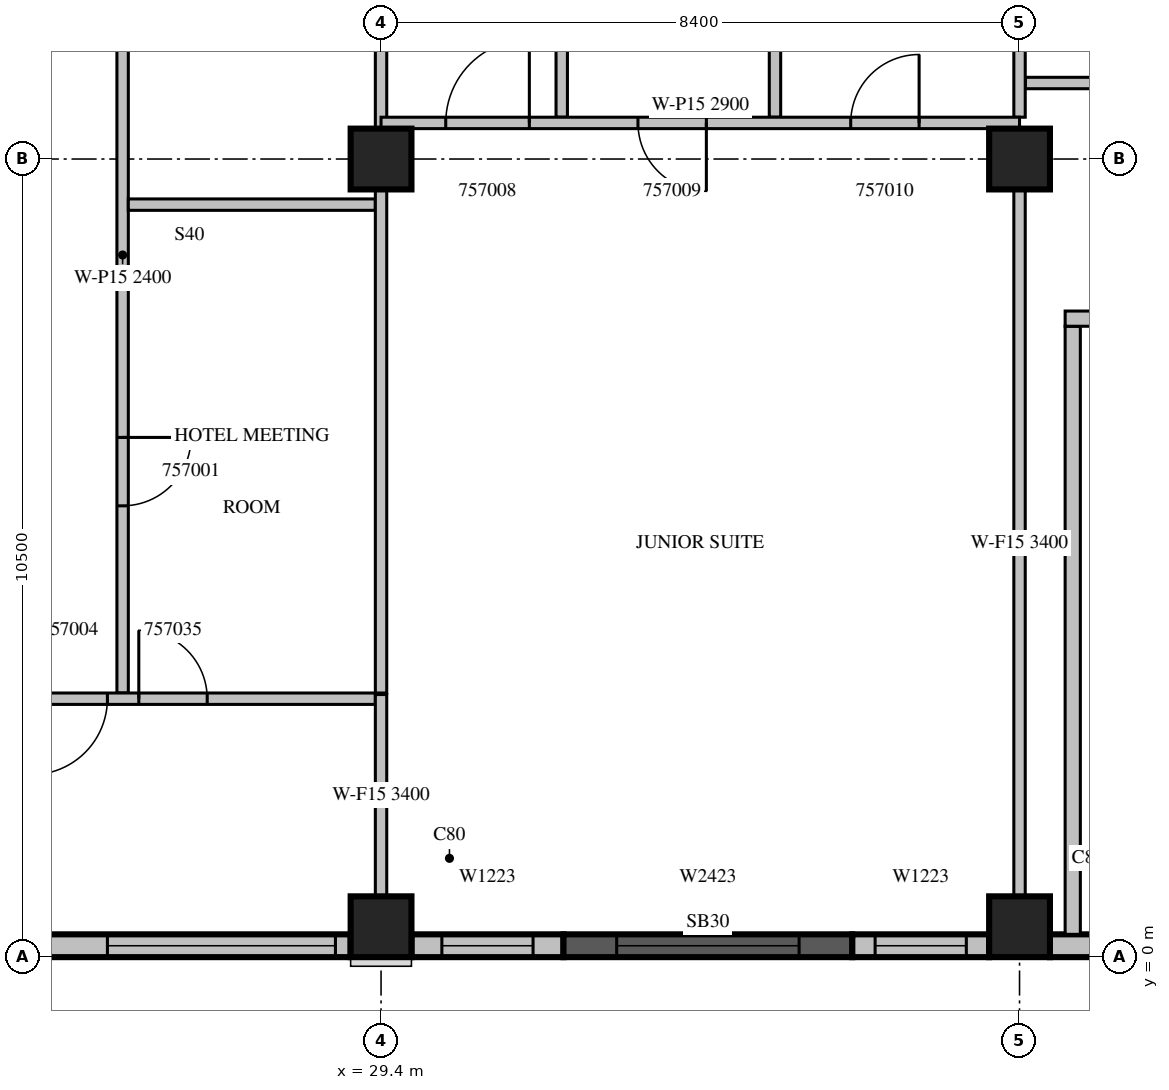
"""IFC4 building model, lengths in metres.
Left out: names, types, materials, properties, quantities, classifications, styles, units other than length and angle.
Written with IfcOpenShell. Run it as: python <this file> out.ifc"""

import sys

from ifc_helpers import new_model, si_unit, direction, frame, frame_2d, origin, origin_2d, place, context, subcontext, project, spatial, rectangle, extrude, source, transform, mapped, element, fill, save


model = new_model("IFC4")
c1 = context("Model", 3, precision=1e-05, world=origin(), true_north=direction((0.0, 1.0)))
c2 = subcontext(c1, "Body", "Model", "MODEL_VIEW")
j1 = project(units=[si_unit("LENGTHUNIT", "METRE"), si_unit("PLANEANGLEUNIT", "RADIAN")], contexts=[c1])
p1 = place(None, origin())
s1 = spatial("IfcSite", under=j1, at=p1, CompositionType="ELEMENT")
p2 = place(p1, origin())
s2 = spatial("IfcBuilding", under=s1, at=p2, CompositionType="ELEMENT")
p3 = place(p2, frame((0.0, 0.0, 250.0)))
s3 = spatial("IfcBuildingStorey", under=s2, at=p3, CompositionType="ELEMENT", Elevation=250.0)
m1 = source(origin(), c2, "Body", "SweptSolid", [
    extrude(rectangle(XDim=0.8, YDim=0.8, at=origin_2d()), origin(), (0.0, 0.0, 1.0), 3.8),
])
for number, where, z_axis, x_axis in (
    (1, (29.4, 0.4, 0.0), (0.0, 0.0, 1.0), (1.0, 0.0, 0.0)),
    (2, (37.8, 0.4, 0.0), (0.0, 0.0, 1.0), (1.0, 0.0, 0.0)),
    (3, (29.4, 10.5, 0.0), (0.0, 0.0, 1.0), (1.0, 0.0, 0.0)),
    (4, (37.8, 10.5, 0.0), (0.0, 0.0, 1.0), (1.0, 0.0, 0.0)),
):
    element("IfcColumn", number, at=place(p3, frame(where, z_axis=z_axis, x_axis=x_axis)), inside=s3, PredefinedType="COLUMN", context=c2, shape_type="MappedRepresentation", body=[
        mapped(m1, transform((0.0, 0.0, 0.0), scale=1.0)),
    ])
m2 = source(origin(), c2, "Body", "SweptSolid", [
    extrude(rectangle(XDim=7.6, YDim=0.3, at=frame_2d((3.8, 0.0))), origin(), (0.0, 0.0, 1.0), 3.4),
])
p4 = place(p3, frame((21.4, 0.15, 0.0), z_axis=(0.0, 0.0, 1.0), x_axis=(1.0, 0.0, 0.0)))
e5 = element("IfcWall", 5, at=p4, inside=s3, PredefinedType="STANDARD", context=c2, shape_type="MappedRepresentation", body=[
    mapped(m2, transform((0.0, 0.0, 0.0), scale=1.0)),
])
m3 = source(origin(), c2, "Body", "SweptSolid", [
    extrude(rectangle(XDim=3.0, YDim=2.3, at=frame_2d((1.5, 1.15))), frame((0.0, 0.16, 0.0), z_axis=(0.0, -1.0, 0.0), x_axis=(1.0, 0.0, 0.0)), (0.0, 0.0, 1.0), 0.32),
])
p5 = place(p4, frame((0.2, 0.0, 0.6)))
e6 = element("IfcOpeningElement", 6, at=p5, cuts=e5, PredefinedType="OPENING", context=c2, shape_type="MappedRepresentation", body=[
    mapped(m3, transform((0.0, 0.0, 0.0), scale=1.0)),
])
p6 = place(p4, frame((4.4, 0.0, 0.6)))
e7 = element("IfcOpeningElement", 7, at=p6, cuts=e5, PredefinedType="OPENING", context=c2, shape_type="MappedRepresentation", body=[
    mapped(m3, transform((0.0, 0.0, 0.0), scale=1.0)),
])
m4 = source(origin(), c2, "Body", "SweptSolid", [
    extrude(rectangle(XDim=2.0, YDim=0.3, at=frame_2d((1.0, 0.0))), origin(), (0.0, 0.0, 1.0), 3.4),
])
p7 = place(p3, frame((29.8, 0.15, 0.0), z_axis=(0.0, 0.0, 1.0), x_axis=(1.0, 0.0, 0.0)))
e8 = element("IfcWall", 8, at=p7, inside=s3, PredefinedType="STANDARD", context=c2, shape_type="MappedRepresentation", body=[
    mapped(m4, transform((0.0, 0.0, 0.0), scale=1.0)),
])
m5 = source(origin(), c2, "Body", "SweptSolid", [
    extrude(rectangle(XDim=1.2, YDim=2.3, at=frame_2d((0.6, 1.15))), frame((0.0, 0.16, 0.0), z_axis=(0.0, -1.0, 0.0), x_axis=(1.0, 0.0, 0.0)), (0.0, 0.0, 1.0), 0.32),
])
p8 = place(p7, frame((0.4, 0.0, 0.6)))
e9 = element("IfcOpeningElement", 9, at=p8, cuts=e8, PredefinedType="OPENING", context=c2, shape_type="MappedRepresentation", body=[
    mapped(m5, transform((0.0, 0.0, 0.0), scale=1.0)),
])
m6 = source(origin(), c2, "Body", "SweptSolid", [
    extrude(rectangle(XDim=3.8, YDim=0.3, at=frame_2d((1.9, 0.0))), origin(), (0.0, 0.0, 1.0), 3.4),
])
p9 = place(p3, frame((31.8, 0.15, 0.0), z_axis=(0.0, 0.0, 1.0), x_axis=(1.0, 0.0, 0.0)))
e10 = element("IfcWall", 10, at=p9, inside=s3, PredefinedType="SOLIDWALL", context=c2, shape_type="MappedRepresentation", body=[
    mapped(m6, transform((0.0, 0.0, 0.0), scale=1.0)),
])
m7 = source(origin(), c2, "Body", "SweptSolid", [
    extrude(rectangle(XDim=2.4, YDim=2.3, at=frame_2d((1.2, 1.15))), frame((0.0, 0.16, 0.0), z_axis=(0.0, -1.0, 0.0), x_axis=(1.0, 0.0, 0.0)), (0.0, 0.0, 1.0), 0.32),
])
p10 = place(p9, frame((0.7, 0.0, 0.6)))
e11 = element("IfcOpeningElement", 11, at=p10, cuts=e10, PredefinedType="OPENING", context=c2, shape_type="MappedRepresentation", body=[
    mapped(m7, transform((0.0, 0.0, 0.0), scale=1.0)),
])
m8 = source(origin(), c2, "Body", "SweptSolid", [
    extrude(rectangle(XDim=1.8, YDim=0.3, at=frame_2d((0.9, 0.0))), origin(), (0.0, 0.0, 1.0), 3.4),
])
p11 = place(p3, frame((35.6, 0.15, 0.0), z_axis=(0.0, 0.0, 1.0), x_axis=(1.0, 0.0, 0.0)))
e12 = element("IfcWall", 12, at=p11, inside=s3, PredefinedType="STANDARD", context=c2, shape_type="MappedRepresentation", body=[
    mapped(m8, transform((0.0, 0.0, 0.0), scale=1.0)),
])
p12 = place(p11, frame((0.3, 0.0, 0.6)))
e13 = element("IfcOpeningElement", 13, at=p12, cuts=e12, PredefinedType="OPENING", context=c2, shape_type="MappedRepresentation", body=[
    mapped(m5, transform((0.0, 0.0, 0.0), scale=1.0)),
])
p13 = place(p3, frame((38.2, 0.15, 0.0), z_axis=(0.0, 0.0, 1.0), x_axis=(1.0, 0.0, 0.0)))
e14 = element("IfcWall", 14, at=p13, inside=s3, PredefinedType="STANDARD", context=c2, shape_type="MappedRepresentation", body=[
    mapped(m4, transform((0.0, 0.0, 0.0), scale=1.0)),
])
m9 = source(origin(), c2, "Body", "SweptSolid", [
    extrude(rectangle(XDim=8.0, YDim=0.2, at=frame_2d((4.0, 0.0))), origin(), (0.0, 0.0, 1.0), 3.4),
])
p14 = place(p3, frame((38.5, 0.3, 0.0), z_axis=(0.0, 0.0, 1.0), x_axis=(0.0, 1.0, 0.0)))
e15 = element("IfcWall", 15, at=p14, inside=s3, PredefinedType="PARTITIONING", context=c2, shape_type="MappedRepresentation", body=[
    mapped(m9, transform((0.0, 0.0, 0.0), scale=1.0)),
])
m10 = source(origin(), c2, "Body", "SweptSolid", [
    extrude(rectangle(XDim=5.45, YDim=0.2, at=frame_2d((2.725, 0.0))), origin(), (0.0, 0.0, 1.0), 3.4),
])
p15 = place(p3, frame((38.4, 8.4, 0.0), z_axis=(0.0, 0.0, 1.0), x_axis=(1.0, 0.0, 0.0)))
e16 = element("IfcWall", 16, at=p15, inside=s3, PredefinedType="PARTITIONING", context=c2, shape_type="MappedRepresentation", body=[
    mapped(m10, transform((0.0, 0.0, 0.0), scale=1.0)),
])
m11 = source(origin(), c2, "Body", "SweptSolid", [
    extrude(rectangle(XDim=1.2, YDim=2.1, at=frame_2d((0.6, 1.05))), frame((0.0, 0.11, 0.0), z_axis=(0.0, -1.0, 0.0), x_axis=(1.0, 0.0, 0.0)), (0.0, 0.0, 1.0), 0.22),
])
p16 = place(p15, frame((0.4, 0.0, 0.0)))
e17 = element("IfcOpeningElement", 17, at=p16, cuts=e16, PredefinedType="OPENING", context=c2, shape_type="MappedRepresentation", body=[
    mapped(m11, transform((0.0, 0.0, 0.0), scale=1.0)),
])
m12 = source(origin(), c2, "Body", "SweptSolid", [
    extrude(rectangle(XDim=0.9, YDim=2.1, at=frame_2d((0.45, 1.05))), frame((0.0, 0.11, 0.0), z_axis=(0.0, -1.0, 0.0), x_axis=(1.0, 0.0, 0.0)), (0.0, 0.0, 1.0), 0.22),
])
p17 = place(p15, frame((3.25, 0.0, 0.0)))
e18 = element("IfcOpeningElement", 18, at=p17, cuts=e16, PredefinedType="OPENING", context=c2, shape_type="MappedRepresentation", body=[
    mapped(m12, transform((0.0, 0.0, 0.0), scale=1.0)),
])
m13 = source(origin(), c2, "Body", "SweptSolid", [
    extrude(rectangle(XDim=11.525, YDim=0.15, at=frame_2d((5.763, 0.0))), origin(), (0.0, 0.0, 1.0), 2.4),
])
p18 = place(p3, frame((26.0, 15.0, 0.0), z_axis=(0.0, 0.0, 1.0), x_axis=(0.0, -1.0, 0.0)))
e19 = element("IfcWall", 19, at=p18, inside=s3, PredefinedType="PARTITIONING", context=c2, shape_type="MappedRepresentation", body=[
    mapped(m13, transform((0.0, 0.0, 0.0), scale=1.0)),
])
m14 = source(origin(), c2, "Body", "SweptSolid", [
    extrude(rectangle(XDim=0.9, YDim=2.1, at=frame_2d((0.45, 1.05))), frame((0.0, 0.085, 0.0), z_axis=(0.0, -1.0, 0.0), x_axis=(1.0, 0.0, 0.0)), (0.0, 0.0, 1.0), 0.17),
])
p19 = place(p18, frame((8.162, 0.0, 0.0)))
e20 = element("IfcOpeningElement", 20, at=p19, cuts=e19, PredefinedType="OPENING", context=c2, shape_type="MappedRepresentation", body=[
    mapped(m14, transform((0.0, 0.0, 0.0), scale=1.0)),
])
p20 = place(p18, frame((1.525, 0.0, 0.0)))
e21 = element("IfcOpeningElement", 21, at=p20, cuts=e19, PredefinedType="OPENING", context=c2, shape_type="MappedRepresentation", body=[
    mapped(m14, transform((0.0, 0.0, 0.0), scale=1.0)),
])
m15 = source(origin(), c2, "Body", "SweptSolid", [
    extrude(rectangle(XDim=3.25, YDim=0.15, at=frame_2d((1.625, 0.0))), origin(), (0.0, 0.0, 1.0), 3.4),
])
p21 = place(p3, frame((29.325, 9.9, 0.0), z_axis=(0.0, 0.0, 1.0), x_axis=(-1.0, 0.0, 0.0)))
e22 = element("IfcWall", 22, at=p21, inside=s3, PredefinedType="PARTITIONING", context=c2, shape_type="MappedRepresentation", body=[
    mapped(m15, transform((0.0, 0.0, 0.0), scale=1.0)),
])
m16 = source(origin(), c2, "Body", "SweptSolid", [
    extrude(rectangle(XDim=6.626, YDim=0.15, at=frame_2d((3.313, 0.0))), origin(), (0.0, 0.0, 1.0), 3.4),
])
p22 = place(p3, frame((29.4, 3.475, 0.0), z_axis=(0.0, 0.0, 1.0), x_axis=(0.0, 1.0, 0.0)))
e23 = element("IfcWall", 23, at=p22, inside=s3, PredefinedType="PARTITIONING", context=c2, shape_type="MappedRepresentation", body=[
    mapped(m16, transform((0.0, 0.0, 0.0), scale=1.0)),
])
m17 = source(origin(), c2, "Body", "SweptSolid", [
    extrude(rectangle(XDim=4.101, YDim=0.15, at=frame_2d((2.05, 0.0))), origin(), (0.0, 0.0, 1.0), 3.4),
])
p23 = place(p3, frame((29.4, 10.899, 0.0), z_axis=(0.0, 0.0, 1.0), x_axis=(0.0, 1.0, 0.0)))
e24 = element("IfcWall", 24, at=p23, inside=s3, PredefinedType="PARTITIONING", context=c2, shape_type="MappedRepresentation", body=[
    mapped(m17, transform((0.0, 0.0, 0.0), scale=1.0)),
])
m18 = source(origin(), c2, "Body", "SweptSolid", [
    extrude(rectangle(XDim=7.525, YDim=0.15, at=frame_2d((3.763, 0.0))), origin(), (0.0, 0.0, 1.0), 3.4),
])
p24 = place(p3, frame((21.8, 3.4, 0.0), z_axis=(0.0, 0.0, 1.0), x_axis=(1.0, 0.0, 0.0)))
e25 = element("IfcWall", 25, at=p24, inside=s3, PredefinedType="PARTITIONING", context=c2, shape_type="MappedRepresentation", body=[
    mapped(m18, transform((0.0, 0.0, 0.0), scale=1.0)),
])
m19 = source(origin(), c2, "Body", "SweptSolid", [
    extrude(rectangle(XDim=1.0, YDim=2.1, at=frame_2d((0.5, 1.05))), frame((0.0, 0.085, 0.0), z_axis=(0.0, -1.0, 0.0), x_axis=(1.0, 0.0, 0.0)), (0.0, 0.0, 1.0), 0.17),
])
p25 = place(p24, frame((3.0, 0.0, 0.0)))
e26 = element("IfcOpeningElement", 26, at=p25, cuts=e25, PredefinedType="OPENING", context=c2, shape_type="MappedRepresentation", body=[
    mapped(m19, transform((0.0, 0.0, 0.0), scale=1.0)),
])
p26 = place(p24, frame((4.413, 0.0, 0.0)))
e27 = element("IfcOpeningElement", 27, at=p26, cuts=e25, PredefinedType="OPENING", context=c2, shape_type="MappedRepresentation", body=[
    mapped(m14, transform((0.0, 0.0, 0.0), scale=1.0)),
])
m20 = source(origin(), c2, "Body", "SweptSolid", [
    extrude(rectangle(XDim=6.45, YDim=0.15, at=frame_2d((3.225, 0.0))), origin(), (0.0, 0.0, 1.0), 3.4),
])
p27 = place(p3, frame((37.875, 11.5, 0.0), z_axis=(0.0, 0.0, 1.0), x_axis=(1.0, 0.0, 0.0)))
e28 = element("IfcWall", 28, at=p27, inside=s3, PredefinedType="PARTITIONING", context=c2, shape_type="MappedRepresentation", body=[
    mapped(m20, transform((0.0, 0.0, 0.0), scale=1.0)),
])
m21 = source(origin(), c2, "Body", "SweptSolid", [
    extrude(rectangle(XDim=3.95, YDim=0.15, at=frame_2d((1.975, 0.0))), origin(), (0.0, 0.0, 1.0), 3.4),
])
for number, where, z_axis, x_axis in (
    (29, (31.777, 11.05, 0.0), (0.0, 0.0, 1.0), (0.0, 1.0, 0.0)),
    (30, (34.583, 11.05, 0.0), (0.0, 0.0, 1.0), (0.0, 1.0, 0.0)),
):
    element("IfcWall", number, at=place(p3, frame(where, z_axis=z_axis, x_axis=x_axis)), inside=s3, PredefinedType="PARTITIONING", context=c2, shape_type="MappedRepresentation", body=[
        mapped(m21, transform((0.0, 0.0, 0.0), scale=1.0)),
    ])
m22 = source(origin(), c2, "Body", "SweptSolid", [
    extrude(rectangle(XDim=2.656, YDim=0.15, at=frame_2d((1.328, 0.0))), origin(), (0.0, 0.0, 1.0), 3.4),
])
p28 = place(p3, frame((29.4, 0.799, 0.0), z_axis=(0.0, 0.0, 1.0), x_axis=(0.0, 1.0, 0.0)))
e31 = element("IfcWall", 31, at=p28, inside=s3, PredefinedType="PARTITIONING", context=c2, shape_type="MappedRepresentation", body=[
    mapped(m22, transform((0.0, 0.0, 0.0), scale=1.0)),
])
m23 = source(origin(), c2, "Body", "SweptSolid", [
    extrude(rectangle(XDim=9.302, YDim=0.15, at=frame_2d((4.651, 0.0))), origin(), (0.0, 0.0, 1.0), 3.4),
])
p29 = place(p3, frame((37.8, 0.799, 0.0), z_axis=(0.0, 0.0, 1.0), x_axis=(0.0, 1.0, 0.0)))
e32 = element("IfcWall", 32, at=p29, inside=s3, PredefinedType="PARTITIONING", context=c2, shape_type="MappedRepresentation", body=[
    mapped(m23, transform((0.0, 0.0, 0.0), scale=1.0)),
])
p30 = place(p3, frame((37.8, 11.05, 0.0), z_axis=(0.0, 0.0, 1.0), x_axis=(0.0, 1.0, 0.0)))
e33 = element("IfcWall", 33, at=p30, inside=s3, PredefinedType="PARTITIONING", context=c2, shape_type="MappedRepresentation", body=[
    mapped(m21, transform((0.0, 0.0, 0.0), scale=1.0)),
])
m24 = source(origin(), c2, "Body", "SweptSolid", [
    extrude(rectangle(XDim=8.4, YDim=0.15, at=frame_2d((4.2, 0.0))), origin(), (0.0, 0.0, 1.0), 2.9),
])
p31 = place(p3, frame((37.8, 10.975, 0.0), z_axis=(0.0, 0.0, 1.0), x_axis=(-1.0, 0.0, 0.0)))
e34 = element("IfcWall", 34, at=p31, inside=s3, PredefinedType="PARTITIONING", context=c2, shape_type="MappedRepresentation", body=[
    mapped(m24, transform((0.0, 0.0, 0.0), scale=1.0)),
])
m25 = source(origin(), c2, "Body", "SweptSolid", [
    extrude(rectangle(XDim=1.1, YDim=2.1, at=frame_2d((0.55, 1.05))), frame((0.0, 0.085, 0.0), z_axis=(0.0, -1.0, 0.0), x_axis=(1.0, 0.0, 0.0)), (0.0, 0.0, 1.0), 0.17),
])
p32 = place(p31, frame((6.449, 0.0, 0.0)))
e35 = element("IfcOpeningElement", 35, at=p32, cuts=e34, PredefinedType="OPENING", context=c2, shape_type="MappedRepresentation", body=[
    mapped(m25, transform((0.0, 0.0, 0.0), scale=1.0)),
])
p33 = place(p31, frame((4.12, 0.0, 0.0)))
e36 = element("IfcOpeningElement", 36, at=p33, cuts=e34, PredefinedType="OPENING", context=c2, shape_type="MappedRepresentation", body=[
    mapped(m14, transform((0.0, 0.0, 0.0), scale=1.0)),
])
p34 = place(p31, frame((1.321, 0.0, 0.0)))
e37 = element("IfcOpeningElement", 37, at=p34, cuts=e34, PredefinedType="OPENING", context=c2, shape_type="MappedRepresentation", body=[
    mapped(m14, transform((0.0, 0.0, 0.0), scale=1.0)),
])
m26 = source(origin(), c2, "Body", "SweptSolid", [
    extrude(rectangle(XDim=3.0, YDim=2.3, at=frame_2d((1.5, 1.15))), frame((0.0, 0.03, 0.0), z_axis=(0.0, -1.0, 0.0), x_axis=(1.0, 0.0, 0.0)), (0.0, 0.0, 1.0), 0.06),
])
p35 = place(p6, origin())
e38 = element("IfcWindow", 38, at=p35, inside=s3, PartitioningType="SINGLE_PANEL", PredefinedType="WINDOW", context=c2, shape_type="MappedRepresentation", body=[
    mapped(m26, transform((0.0, 0.0, 0.0), scale=1.0)),
])
fill(e7, e38)
m27 = source(origin(), c2, "Body", "SweptSolid", [
    extrude(rectangle(XDim=1.2, YDim=2.3, at=frame_2d((0.6, 1.15))), frame((0.0, 0.03, 0.0), z_axis=(0.0, -1.0, 0.0), x_axis=(1.0, 0.0, 0.0)), (0.0, 0.0, 1.0), 0.06),
])
p36 = place(p8, origin())
e39 = element("IfcWindow", 39, at=p36, inside=s3, PartitioningType="SINGLE_PANEL", PredefinedType="WINDOW", context=c2, shape_type="MappedRepresentation", body=[
    mapped(m27, transform((0.0, 0.0, 0.0), scale=1.0)),
])
fill(e9, e39)
m28 = source(origin(), c2, "Body", "SweptSolid", [
    extrude(rectangle(XDim=2.4, YDim=2.3, at=frame_2d((1.2, 1.15))), frame((0.0, 0.03, 0.0), z_axis=(0.0, -1.0, 0.0), x_axis=(1.0, 0.0, 0.0)), (0.0, 0.0, 1.0), 0.06),
])
p37 = place(p10, origin())
e40 = element("IfcWindow", 40, at=p37, inside=s3, PartitioningType="SINGLE_PANEL", PredefinedType="WINDOW", context=c2, shape_type="MappedRepresentation", body=[
    mapped(m28, transform((0.0, 0.0, 0.0), scale=1.0)),
])
fill(e11, e40)
p38 = place(p12, origin())
e41 = element("IfcWindow", 41, at=p38, inside=s3, PartitioningType="SINGLE_PANEL", PredefinedType="WINDOW", context=c2, shape_type="MappedRepresentation", body=[
    mapped(m27, transform((0.0, 0.0, 0.0), scale=1.0)),
])
fill(e13, e41)
m29 = source(origin(), c2, "Body", "SweptSolid", [
    extrude(rectangle(XDim=0.9, YDim=2.1, at=frame_2d((0.45, 1.05))), frame((0.0, 0.025, 0.0), z_axis=(0.0, -1.0, 0.0), x_axis=(1.0, 0.0, 0.0)), (0.0, 0.0, 1.0), 0.05),
])
p39 = place(p19, origin())
e42 = element("IfcDoor", 42, at=p39, inside=s3, OperationType="SINGLE_SWING_LEFT", PredefinedType="DOOR", context=c2, shape_type="MappedRepresentation", body=[
    mapped(m29, transform((0.0, 0.0, 0.0), scale=1.0)),
])
fill(e20, e42)
m30 = source(origin(), c2, "Body", "SweptSolid", [
    extrude(rectangle(XDim=1.0, YDim=2.1, at=frame_2d((0.5, 1.05))), frame((0.0, 0.025, 0.0), z_axis=(0.0, -1.0, 0.0), x_axis=(1.0, 0.0, 0.0)), (0.0, 0.0, 1.0), 0.05),
])
p40 = place(p25, origin())
e43 = element("IfcDoor", 43, at=p40, inside=s3, OperationType="SINGLE_SWING_RIGHT", PredefinedType="DOOR", context=c2, shape_type="MappedRepresentation", body=[
    mapped(m30, transform((0.0, 0.0, 0.0), scale=1.0)),
])
fill(e26, e43)
m31 = source(origin(), c2, "Body", "SweptSolid", [
    extrude(rectangle(XDim=1.1, YDim=2.1, at=frame_2d((0.55, 1.05))), frame((0.0, 0.025, 0.0), z_axis=(0.0, -1.0, 0.0), x_axis=(1.0, 0.0, 0.0)), (0.0, 0.0, 1.0), 0.05),
])
p41 = place(p32, origin())
e44 = element("IfcDoor", 44, at=p41, inside=s3, OperationType="SINGLE_SWING_RIGHT", PredefinedType="DOOR", context=c2, shape_type="MappedRepresentation", body=[
    mapped(m31, transform((0.0, 0.0, 0.0), scale=1.0)),
])
fill(e35, e44)
p42 = place(p33, origin())
e45 = element("IfcDoor", 45, at=p42, inside=s3, OperationType="SINGLE_SWING_LEFT", PredefinedType="DOOR", context=c2, shape_type="MappedRepresentation", body=[
    mapped(m29, transform((0.0, 0.0, 0.0), scale=1.0)),
])
fill(e36, e45)
p43 = place(p34, origin())
e46 = element("IfcDoor", 46, at=p43, inside=s3, OperationType="SINGLE_SWING_RIGHT", PredefinedType="DOOR", context=c2, shape_type="MappedRepresentation", body=[
    mapped(m29, transform((0.0, 0.0, 0.0), scale=1.0)),
])
fill(e37, e46)
p44 = place(p26, origin())
e47 = element("IfcDoor", 47, at=p44, inside=s3, OperationType="SINGLE_SWING_LEFT", PredefinedType="DOOR", context=c2, shape_type="MappedRepresentation", body=[
    mapped(m29, transform((0.0, 0.0, 0.0), scale=1.0)),
])
fill(e27, e47)
save(model, sys.argv[1])
